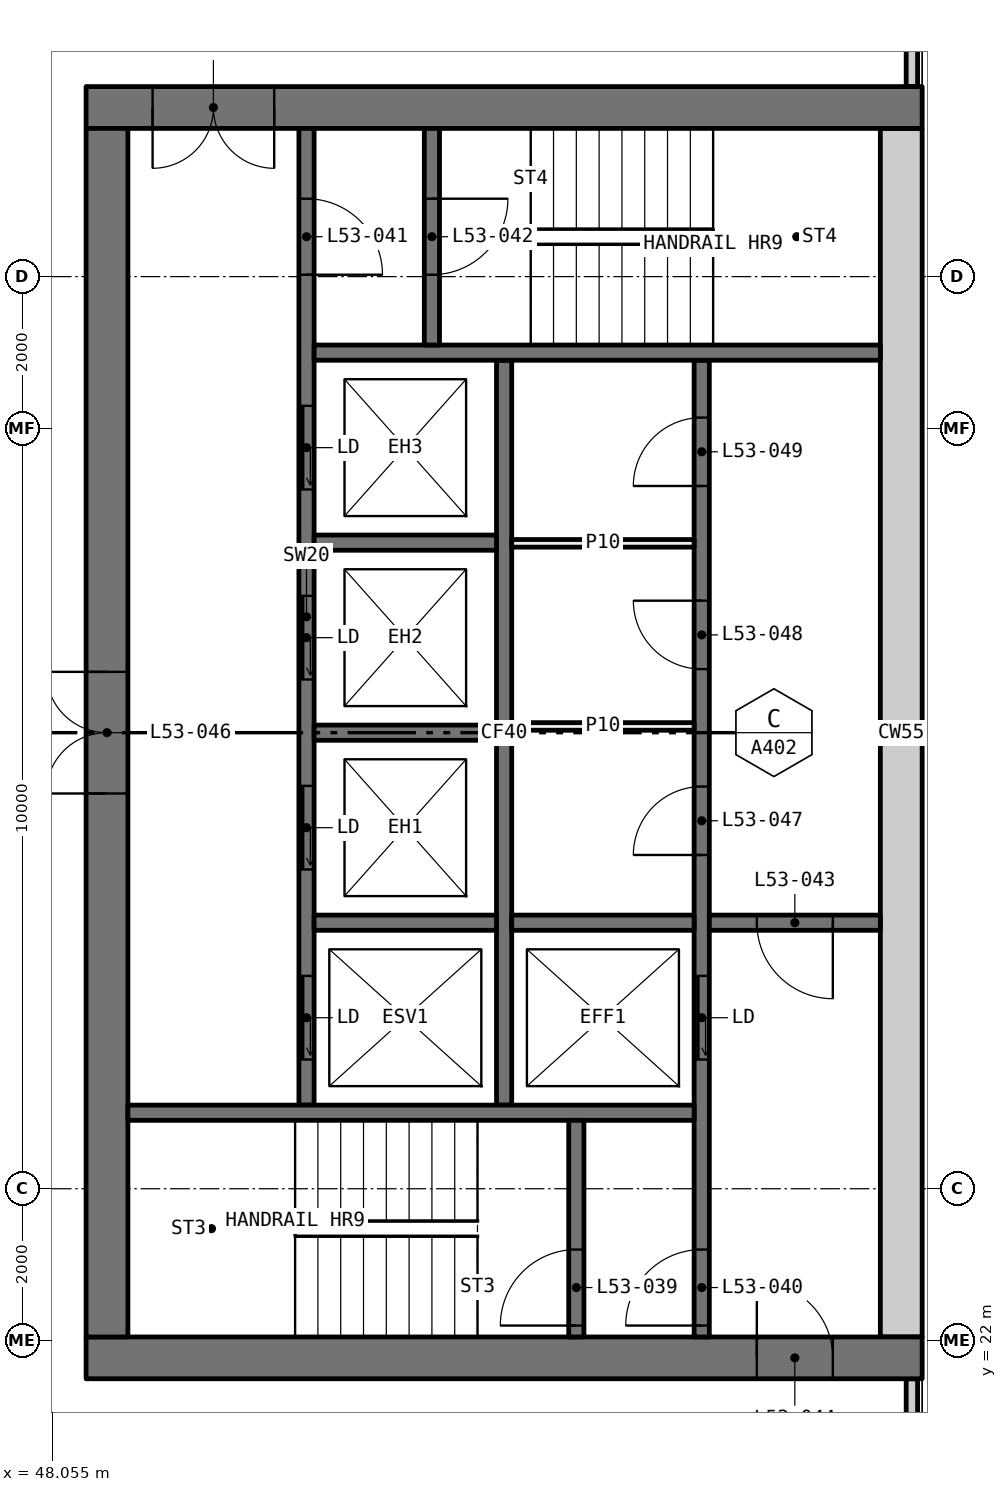
"""IFC4 building model, lengths in metres.
Left out: names, types, materials, properties, quantities, classifications, styles, units other than length and angle.
Written with IfcOpenShell. Run it as: python <this file> out.ifc"""

import sys

from ifc_helpers import new_model, si_unit, direction, frame, frame_2d, origin, place, context, subcontext, project, spatial, rectangle, extrude, element, fill, save


model = new_model("IFC4")
c1 = context("Model", 3, precision=1e-05, world=origin(), true_north=direction((0.0, 1.0)))
c2 = subcontext(c1, "Body", "Model", "MODEL_VIEW")
j1 = project(units=[si_unit("LENGTHUNIT", "METRE"), si_unit("PLANEANGLEUNIT", "RADIAN")], contexts=[c1])
p1 = place(None, origin())
s1 = spatial("IfcSite", under=j1, at=p1, CompositionType="ELEMENT")
p2 = place(p1, origin())
s2 = spatial("IfcBuilding", under=s1, at=p2, CompositionType="ELEMENT")
p3 = place(p2, frame((0.0, 0.0, 199.65)))
s3 = spatial("IfcBuildingStorey", under=s2, at=p3, CompositionType="ELEMENT", Elevation=199.65)
for number, where, z_axis, x_axis in (
    (1, (59.365, 18.71, 0.0), (0.0, 0.0, 1.0), (0.0, 1.0, 0.0)),
    (2, (59.365, 38.5, 0.0), (0.0, 0.0, 1.0), (0.0, 1.0, 0.0)),
):
    element("IfcWall", number, at=place(p3, frame(where, z_axis=z_axis, x_axis=x_axis)), inside=s3, PredefinedType="ELEMENTEDWALL", context=c2, shape_type="SweptSolid", body=[
        extrude(rectangle(XDim=2.79, YDim=0.15, at=frame_2d((1.395, 0.0))), origin(), (0.0, 0.0, 1.0), 3.05),
    ])
p4 = place(p3, frame((59.5, 21.775, 0.0), z_axis=(0.0, 0.0, 1.0), x_axis=(-1.0, 0.0, 0.0)))
e3 = element("IfcWall", 3, at=p4, inside=s3, PredefinedType="SHEAR", context=c2, shape_type="SweptSolid", body=[
    extrude(rectangle(XDim=11.0, YDim=0.55, at=frame_2d((5.5, 0.0))), origin(), (0.0, 0.0, 1.0), 3.05),
])
p5 = place(p4, frame((1.175, 0.0, 0.0)))
e4 = element("IfcOpeningElement", 4, at=p5, cuts=e3, PredefinedType="OPENING", context=c2, shape_type="SweptSolid", body=[
    extrude(rectangle(XDim=1.0, YDim=2.1, at=frame_2d((0.5, 1.05))), frame((0.0, 0.285, 0.0), z_axis=(0.0, -1.0, 0.0), x_axis=(1.0, 0.0, 0.0)), (0.0, 0.0, 1.0), 0.57),
])
p6 = place(p3, frame((59.5, 38.225, 0.0), z_axis=(0.0, 0.0, 1.0), x_axis=(-1.0, 0.0, 0.0)))
e5 = element("IfcWall", 5, at=p6, inside=s3, PredefinedType="SHEAR", context=c2, shape_type="SweptSolid", body=[
    extrude(rectangle(XDim=11.0, YDim=0.55, at=frame_2d((5.5, 0.0))), origin(), (0.0, 0.0, 1.0), 3.05),
])
p7 = place(p6, frame((8.525, 0.0, 0.0)))
e6 = element("IfcOpeningElement", 6, at=p7, cuts=e5, PredefinedType="OPENING", context=c2, shape_type="SweptSolid", body=[
    extrude(rectangle(XDim=1.6, YDim=2.1, at=frame_2d((0.8, 1.05))), frame((0.0, 0.285, 0.0), z_axis=(0.0, -1.0, 0.0), x_axis=(1.0, 0.0, 0.0)), (0.0, 0.0, 1.0), 0.57),
])
p8 = place(p3, frame((59.225, 22.05, 0.0), z_axis=(0.0, 0.0, 1.0), x_axis=(0.0, 1.0, 0.0)))
e7 = element("IfcWall", 7, at=p8, inside=s3, PredefinedType="SHEAR", context=c2, shape_type="SweptSolid", body=[
    extrude(rectangle(XDim=15.9, YDim=0.55, at=frame_2d((7.95, 0.0))), origin(), (0.0, 0.0, 1.0), 3.05),
])
p9 = place(p3, frame((48.775, 22.05, 0.0), z_axis=(0.0, 0.0, 1.0), x_axis=(0.0, 1.0, 0.0)))
e8 = element("IfcWall", 8, at=p9, inside=s3, PredefinedType="SHEAR", context=c2, shape_type="SweptSolid", body=[
    extrude(rectangle(XDim=15.9, YDim=0.55, at=frame_2d((7.95, 0.0))), origin(), (0.0, 0.0, 1.0), 3.05),
])
p10 = place(p9, frame((7.15, 0.0, 0.0)))
e9 = element("IfcOpeningElement", 9, at=p10, cuts=e8, PredefinedType="OPENING", context=c2, shape_type="SweptSolid", body=[
    extrude(rectangle(XDim=1.6, YDim=2.1, at=frame_2d((0.8, 1.05))), frame((0.0, 0.285, 0.0), z_axis=(0.0, -1.0, 0.0), x_axis=(1.0, 0.0, 0.0)), (0.0, 0.0, 1.0), 0.57),
])
p11 = place(p3, frame((56.6, 22.05, 0.0), z_axis=(0.0, 0.0, 1.0), x_axis=(0.0, 1.0, 0.0)))
e10 = element("IfcWall", 10, at=p11, inside=s3, PredefinedType="SOLIDWALL", context=c2, shape_type="SweptSolid", body=[
    extrude(rectangle(XDim=12.85, YDim=0.2, at=frame_2d((6.425, 0.0))), origin(), (0.0, 0.0, 1.0), 3.05),
])
p12 = place(p11, frame((3.65, 0.0, 0.0)))
e11 = element("IfcOpeningElement", 11, at=p12, cuts=e10, PredefinedType="OPENING", context=c2, shape_type="SweptSolid", body=[
    extrude(rectangle(XDim=1.1, YDim=2.1, at=frame_2d((0.55, 1.05))), frame((0.0, 0.11, 0.0), z_axis=(0.0, -1.0, 0.0), x_axis=(1.0, 0.0, 0.0)), (0.0, 0.0, 1.0), 0.22),
])
p13 = place(p11, frame((0.15, 0.0, 0.0)))
e12 = element("IfcOpeningElement", 12, at=p13, cuts=e10, PredefinedType="OPENING", context=c2, shape_type="SweptSolid", body=[
    extrude(rectangle(XDim=1.0, YDim=2.1, at=frame_2d((0.5, 1.05))), frame((0.0, 0.11, 0.0), z_axis=(0.0, -1.0, 0.0), x_axis=(1.0, 0.0, 0.0)), (0.0, 0.0, 1.0), 0.22),
])
p14 = place(p11, frame((6.341, 0.0, 0.0)))
e13 = element("IfcOpeningElement", 13, at=p14, cuts=e10, PredefinedType="OPENING", context=c2, shape_type="SweptSolid", body=[
    extrude(rectangle(XDim=0.9, YDim=2.1, at=frame_2d((0.45, 1.05))), frame((0.0, 0.11, 0.0), z_axis=(0.0, -1.0, 0.0), x_axis=(1.0, 0.0, 0.0)), (0.0, 0.0, 1.0), 0.22),
])
p15 = place(p11, frame((8.787, 0.0, 0.0)))
e14 = element("IfcOpeningElement", 14, at=p15, cuts=e10, PredefinedType="OPENING", context=c2, shape_type="SweptSolid", body=[
    extrude(rectangle(XDim=0.9, YDim=2.1, at=frame_2d((0.45, 1.05))), frame((0.0, 0.11, 0.0), z_axis=(0.0, -1.0, 0.0), x_axis=(1.0, 0.0, 0.0)), (0.0, 0.0, 1.0), 0.22),
])
p16 = place(p11, frame((11.196, 0.0, 0.0)))
e15 = element("IfcOpeningElement", 15, at=p16, cuts=e10, PredefinedType="OPENING", context=c2, shape_type="SweptSolid", body=[
    extrude(rectangle(XDim=0.9, YDim=2.1, at=frame_2d((0.45, 1.05))), frame((0.0, 0.11, 0.0), z_axis=(0.0, -1.0, 0.0), x_axis=(1.0, 0.0, 0.0)), (0.0, 0.0, 1.0), 0.22),
])
p17 = place(p3, frame((51.4, 25.1, 0.0), z_axis=(0.0, 0.0, 1.0), x_axis=(0.0, 1.0, 0.0)))
e16 = element("IfcWall", 16, at=p17, inside=s3, PredefinedType="SOLIDWALL", context=c2, shape_type="SweptSolid", body=[
    extrude(rectangle(XDim=12.85, YDim=0.2, at=frame_2d((6.425, 0.0))), origin(), (0.0, 0.0, 1.0), 3.05),
])
p18 = place(p17, frame((0.6, 0.0, 0.0)))
e17 = element("IfcOpeningElement", 17, at=p18, cuts=e16, PredefinedType="OPENING", context=c2, shape_type="SweptSolid", body=[
    extrude(rectangle(XDim=1.1, YDim=2.1, at=frame_2d((0.55, 1.05))), frame((0.0, 0.11, 0.0), z_axis=(0.0, -1.0, 0.0), x_axis=(1.0, 0.0, 0.0)), (0.0, 0.0, 1.0), 0.22),
])
p19 = place(p17, frame((3.1, 0.0, 0.0)))
e18 = element("IfcOpeningElement", 18, at=p19, cuts=e16, PredefinedType="OPENING", context=c2, shape_type="SweptSolid", body=[
    extrude(rectangle(XDim=1.1, YDim=2.1, at=frame_2d((0.55, 1.05))), frame((0.0, 0.11, 0.0), z_axis=(0.0, -1.0, 0.0), x_axis=(1.0, 0.0, 0.0)), (0.0, 0.0, 1.0), 0.22),
])
p20 = place(p17, frame((5.6, 0.0, 0.0)))
e19 = element("IfcOpeningElement", 19, at=p20, cuts=e16, PredefinedType="OPENING", context=c2, shape_type="SweptSolid", body=[
    extrude(rectangle(XDim=1.1, YDim=2.1, at=frame_2d((0.55, 1.05))), frame((0.0, 0.11, 0.0), z_axis=(0.0, -1.0, 0.0), x_axis=(1.0, 0.0, 0.0)), (0.0, 0.0, 1.0), 0.22),
])
p21 = place(p17, frame((8.1, 0.0, 0.0)))
e20 = element("IfcOpeningElement", 20, at=p21, cuts=e16, PredefinedType="OPENING", context=c2, shape_type="SweptSolid", body=[
    extrude(rectangle(XDim=1.1, YDim=2.1, at=frame_2d((0.55, 1.05))), frame((0.0, 0.11, 0.0), z_axis=(0.0, -1.0, 0.0), x_axis=(1.0, 0.0, 0.0)), (0.0, 0.0, 1.0), 0.22),
])
p22 = place(p17, frame((10.925, 0.0, 0.0)))
e21 = element("IfcOpeningElement", 21, at=p22, cuts=e16, PredefinedType="OPENING", context=c2, shape_type="SweptSolid", body=[
    extrude(rectangle(XDim=1.0, YDim=2.1, at=frame_2d((0.5, 1.05))), frame((0.0, 0.11, 0.0), z_axis=(0.0, -1.0, 0.0), x_axis=(1.0, 0.0, 0.0)), (0.0, 0.0, 1.0), 0.22),
])
p23 = place(p3, frame((54.0, 25.1, 0.0), z_axis=(0.0, 0.0, 1.0), x_axis=(0.0, 1.0, 0.0)))
e22 = element("IfcWall", 22, at=p23, inside=s3, PredefinedType="SOLIDWALL", context=c2, shape_type="SweptSolid", body=[
    extrude(rectangle(XDim=9.8, YDim=0.2, at=frame_2d((4.9, 0.0))), origin(), (0.0, 0.0, 1.0), 3.05),
])
for number, where, z_axis, x_axis in (
    (23, (56.5, 25.0, 0.0), (0.0, 0.0, 1.0), (-1.0, 0.0, 0.0)),
    (24, (58.95, 35.0, 0.0), (0.0, 0.0, 1.0), (-1.0, 0.0, 0.0)),
):
    element("IfcWall", number, at=place(p3, frame(where, z_axis=z_axis, x_axis=x_axis)), inside=s3, PredefinedType="SOLIDWALL", context=c2, shape_type="SweptSolid", body=[
        extrude(rectangle(XDim=7.45, YDim=0.2, at=frame_2d((3.725, 0.0))), origin(), (0.0, 0.0, 1.0), 3.05),
    ])
p24 = place(p3, frame((58.95, 27.5, 0.0), z_axis=(0.0, 0.0, 1.0), x_axis=(-1.0, 0.0, 0.0)))
e25 = element("IfcWall", 25, at=p24, inside=s3, PredefinedType="SOLIDWALL", context=c2, shape_type="SweptSolid", body=[
    extrude(rectangle(XDim=2.25, YDim=0.2, at=frame_2d((1.125, 0.0))), origin(), (0.0, 0.0, 1.0), 3.05),
])
p25 = place(p24, frame((0.625, 0.0, 0.0)))
e26 = element("IfcOpeningElement", 26, at=p25, cuts=e25, PredefinedType="OPENING", context=c2, shape_type="SweptSolid", body=[
    extrude(rectangle(XDim=1.0, YDim=2.1, at=frame_2d((0.5, 1.05))), frame((0.0, 0.11, 0.0), z_axis=(0.0, -1.0, 0.0), x_axis=(1.0, 0.0, 0.0)), (0.0, 0.0, 1.0), 0.22),
])
p26 = place(p3, frame((54.95, 22.05, 0.0), z_axis=(0.0, 0.0, 1.0), x_axis=(0.0, 1.0, 0.0)))
e27 = element("IfcWall", 27, at=p26, inside=s3, PredefinedType="SOLIDWALL", context=c2, shape_type="SweptSolid", body=[
    extrude(rectangle(XDim=2.85, YDim=0.2, at=frame_2d((1.425, 0.0))), origin(), (0.0, 0.0, 1.0), 3.05),
])
p27 = place(p26, frame((0.15, 0.0, 0.0)))
e28 = element("IfcOpeningElement", 28, at=p27, cuts=e27, PredefinedType="OPENING", context=c2, shape_type="SweptSolid", body=[
    extrude(rectangle(XDim=1.0, YDim=2.1, at=frame_2d((0.5, 1.05))), frame((0.0, 0.11, 0.0), z_axis=(0.0, -1.0, 0.0), x_axis=(1.0, 0.0, 0.0)), (0.0, 0.0, 1.0), 0.22),
])
p28 = place(p3, frame((53.05, 35.1, 0.0), z_axis=(0.0, 0.0, 1.0), x_axis=(0.0, 1.0, 0.0)))
e29 = element("IfcWall", 29, at=p28, inside=s3, PredefinedType="SOLIDWALL", context=c2, shape_type="SweptSolid", body=[
    extrude(rectangle(XDim=2.85, YDim=0.2, at=frame_2d((1.425, 0.0))), origin(), (0.0, 0.0, 1.0), 3.05),
])
p29 = place(p28, frame((0.925, 0.0, 0.0)))
e30 = element("IfcOpeningElement", 30, at=p29, cuts=e29, PredefinedType="OPENING", context=c2, shape_type="SweptSolid", body=[
    extrude(rectangle(XDim=1.0, YDim=2.1, at=frame_2d((0.5, 1.05))), frame((0.0, 0.11, 0.0), z_axis=(0.0, -1.0, 0.0), x_axis=(1.0, 0.0, 0.0)), (0.0, 0.0, 1.0), 0.22),
])
for number, where, z_axis, x_axis in (
    (31, (56.5, 27.5, 0.0), (0.0, 0.0, 1.0), (-1.0, 0.0, 0.0)),
    (32, (53.9, 27.5, 0.0), (0.0, 0.0, 1.0), (-1.0, 0.0, 0.0)),
    (33, (53.9, 30.0, 0.0), (0.0, 0.0, 1.0), (-1.0, 0.0, 0.0)),
    (34, (53.9, 32.5, 0.0), (0.0, 0.0, 1.0), (-1.0, 0.0, 0.0)),
):
    element("IfcWall", number, at=place(p3, frame(where, z_axis=z_axis, x_axis=x_axis)), inside=s3, PredefinedType="SOLIDWALL", context=c2, shape_type="SweptSolid", body=[
        extrude(rectangle(XDim=2.4, YDim=0.2, at=frame_2d((1.2, 0.0))), origin(), (0.0, 0.0, 1.0), 3.05),
    ])
for number, where, z_axis, x_axis in (
    (35, (56.5, 30.082, 0.0), (0.0, 0.0, 1.0), (-1.0, 0.0, 0.0)),
    (36, (56.5, 32.491, 0.0), (0.0, 0.0, 1.0), (-1.0, 0.0, 0.0)),
):
    element("IfcWall", number, at=place(p3, frame(where, z_axis=z_axis, x_axis=x_axis)), inside=s3, PredefinedType="PARTITIONING", context=c2, shape_type="SweptSolid", body=[
        extrude(rectangle(XDim=2.4, YDim=0.1, at=frame_2d((1.2, 0.0))), origin(), (0.0, 0.0, 1.0), 3.05),
    ])
p30 = place(p18, origin())
e37 = element("IfcDoor", 37, at=p30, inside=s3, OperationType="SLIDING_TO_LEFT", PredefinedType="DOOR", context=c2, shape_type="SweptSolid", body=[
    extrude(rectangle(XDim=1.1, YDim=2.1, at=frame_2d((0.55, 1.05))), frame((0.0, 0.025, 0.0), z_axis=(0.0, -1.0, 0.0), x_axis=(1.0, 0.0, 0.0)), (0.0, 0.0, 1.0), 0.05),
])
fill(e17, e37)
p31 = place(p19, origin())
e38 = element("IfcDoor", 38, at=p31, inside=s3, OperationType="SLIDING_TO_LEFT", PredefinedType="DOOR", context=c2, shape_type="SweptSolid", body=[
    extrude(rectangle(XDim=1.1, YDim=2.1, at=frame_2d((0.55, 1.05))), frame((0.0, 0.025, 0.0), z_axis=(0.0, -1.0, 0.0), x_axis=(1.0, 0.0, 0.0)), (0.0, 0.0, 1.0), 0.05),
])
fill(e18, e38)
p32 = place(p20, origin())
e39 = element("IfcDoor", 39, at=p32, inside=s3, OperationType="SLIDING_TO_LEFT", PredefinedType="DOOR", context=c2, shape_type="SweptSolid", body=[
    extrude(rectangle(XDim=1.1, YDim=2.1, at=frame_2d((0.55, 1.05))), frame((0.0, 0.025, 0.0), z_axis=(0.0, -1.0, 0.0), x_axis=(1.0, 0.0, 0.0)), (0.0, 0.0, 1.0), 0.05),
])
fill(e19, e39)
p33 = place(p21, origin())
e40 = element("IfcDoor", 40, at=p33, inside=s3, OperationType="SLIDING_TO_LEFT", PredefinedType="DOOR", context=c2, shape_type="SweptSolid", body=[
    extrude(rectangle(XDim=1.1, YDim=2.1, at=frame_2d((0.55, 1.05))), frame((0.0, 0.025, 0.0), z_axis=(0.0, -1.0, 0.0), x_axis=(1.0, 0.0, 0.0)), (0.0, 0.0, 1.0), 0.05),
])
fill(e20, e40)
p34 = place(p12, origin())
e41 = element("IfcDoor", 41, at=p34, inside=s3, OperationType="SLIDING_TO_LEFT", PredefinedType="DOOR", context=c2, shape_type="SweptSolid", body=[
    extrude(rectangle(XDim=1.1, YDim=2.1, at=frame_2d((0.55, 1.05))), frame((0.0, 0.025, 0.0), z_axis=(0.0, -1.0, 0.0), x_axis=(1.0, 0.0, 0.0)), (0.0, 0.0, 1.0), 0.05),
])
fill(e11, e41)
p35 = place(p27, origin())
e42 = element("IfcDoor", 42, at=p35, inside=s3, OperationType="SINGLE_SWING_RIGHT", PredefinedType="DOOR", context=c2, shape_type="SweptSolid", body=[
    extrude(rectangle(XDim=1.0, YDim=2.1, at=frame_2d((0.5, 1.05))), frame((0.0, 0.025, 0.0), z_axis=(0.0, -1.0, 0.0), x_axis=(1.0, 0.0, 0.0)), (0.0, 0.0, 1.0), 0.05),
])
fill(e28, e42)
p36 = place(p13, origin())
e43 = element("IfcDoor", 43, at=p36, inside=s3, OperationType="SINGLE_SWING_RIGHT", PredefinedType="DOOR", context=c2, shape_type="SweptSolid", body=[
    extrude(rectangle(XDim=1.0, YDim=2.1, at=frame_2d((0.5, 1.05))), frame((0.0, 0.025, 0.0), z_axis=(0.0, -1.0, 0.0), x_axis=(1.0, 0.0, 0.0)), (0.0, 0.0, 1.0), 0.05),
])
fill(e12, e43)
p37 = place(p22, frame((1.0, 0.0, 0.0), x_axis=(-1.0, 0.0, 0.0)))
e44 = element("IfcDoor", 44, at=p37, inside=s3, OperationType="SINGLE_SWING_LEFT", PredefinedType="DOOR", context=c2, shape_type="SweptSolid", body=[
    extrude(rectangle(XDim=1.0, YDim=2.1, at=frame_2d((0.5, 1.05))), frame((0.0, 0.025, 0.0), z_axis=(0.0, -1.0, 0.0), x_axis=(1.0, 0.0, 0.0)), (0.0, 0.0, 1.0), 0.05),
])
fill(e21, e44)
p38 = place(p29, frame((1.0, 0.0, 0.0), x_axis=(-1.0, 0.0, 0.0)))
e45 = element("IfcDoor", 45, at=p38, inside=s3, OperationType="SINGLE_SWING_RIGHT", PredefinedType="DOOR", context=c2, shape_type="SweptSolid", body=[
    extrude(rectangle(XDim=1.0, YDim=2.1, at=frame_2d((0.5, 1.05))), frame((0.0, 0.025, 0.0), z_axis=(0.0, -1.0, 0.0), x_axis=(1.0, 0.0, 0.0)), (0.0, 0.0, 1.0), 0.05),
])
fill(e30, e45)
p39 = place(p25, origin())
e46 = element("IfcDoor", 46, at=p39, inside=s3, OperationType="SINGLE_SWING_RIGHT", PredefinedType="DOOR", context=c2, shape_type="SweptSolid", body=[
    extrude(rectangle(XDim=1.0, YDim=2.1, at=frame_2d((0.5, 1.05))), frame((0.0, 0.025, 0.0), z_axis=(0.0, -1.0, 0.0), x_axis=(1.0, 0.0, 0.0)), (0.0, 0.0, 1.0), 0.05),
])
fill(e26, e46)
p40 = place(p5, frame((1.0, 0.0, 0.0), x_axis=(-1.0, 0.0, 0.0)))
e47 = element("IfcDoor", 47, at=p40, inside=s3, OperationType="SINGLE_SWING_RIGHT", PredefinedType="DOOR", context=c2, shape_type="SweptSolid", body=[
    extrude(rectangle(XDim=1.0, YDim=2.1, at=frame_2d((0.5, 1.05))), frame((0.0, 0.025, 0.0), z_axis=(0.0, -1.0, 0.0), x_axis=(1.0, 0.0, 0.0)), (0.0, 0.0, 1.0), 0.05),
])
fill(e4, e47)
p41 = place(p7, origin())
e48 = element("IfcDoor", 48, at=p41, inside=s3, OperationType="DOUBLE_DOOR_SINGLE_SWING", PredefinedType="DOOR", context=c2, shape_type="SweptSolid", body=[
    extrude(rectangle(XDim=1.6, YDim=2.1, at=frame_2d((0.8, 1.05))), frame((0.0, 0.025, 0.0), z_axis=(0.0, -1.0, 0.0), x_axis=(1.0, 0.0, 0.0)), (0.0, 0.0, 1.0), 0.05),
])
fill(e6, e48)
p42 = place(p10, origin())
e49 = element("IfcDoor", 49, at=p42, inside=s3, OperationType="DOUBLE_DOOR_SINGLE_SWING", PredefinedType="DOOR", context=c2, shape_type="SweptSolid", body=[
    extrude(rectangle(XDim=1.6, YDim=2.1, at=frame_2d((0.8, 1.05))), frame((0.0, 0.025, 0.0), z_axis=(0.0, -1.0, 0.0), x_axis=(1.0, 0.0, 0.0)), (0.0, 0.0, 1.0), 0.05),
])
fill(e9, e49)
p43 = place(p14, origin())
e50 = element("IfcDoor", 50, at=p43, inside=s3, OperationType="SINGLE_SWING_RIGHT", PredefinedType="DOOR", context=c2, shape_type="SweptSolid", body=[
    extrude(rectangle(XDim=0.9, YDim=2.1, at=frame_2d((0.45, 1.05))), frame((0.0, 0.025, 0.0), z_axis=(0.0, -1.0, 0.0), x_axis=(1.0, 0.0, 0.0)), (0.0, 0.0, 1.0), 0.05),
])
fill(e13, e50)
p44 = place(p15, origin())
e51 = element("IfcDoor", 51, at=p44, inside=s3, OperationType="SINGLE_SWING_LEFT", PredefinedType="DOOR", context=c2, shape_type="SweptSolid", body=[
    extrude(rectangle(XDim=0.9, YDim=2.1, at=frame_2d((0.45, 1.05))), frame((0.0, 0.025, 0.0), z_axis=(0.0, -1.0, 0.0), x_axis=(1.0, 0.0, 0.0)), (0.0, 0.0, 1.0), 0.05),
])
fill(e14, e51)
p45 = place(p16, origin())
e52 = element("IfcDoor", 52, at=p45, inside=s3, OperationType="SINGLE_SWING_RIGHT", PredefinedType="DOOR", context=c2, shape_type="SweptSolid", body=[
    extrude(rectangle(XDim=0.9, YDim=2.1, at=frame_2d((0.45, 1.05))), frame((0.0, 0.025, 0.0), z_axis=(0.0, -1.0, 0.0), x_axis=(1.0, 0.0, 0.0)), (0.0, 0.0, 1.0), 0.05),
])
fill(e15, e52)
save(model, sys.argv[1])
